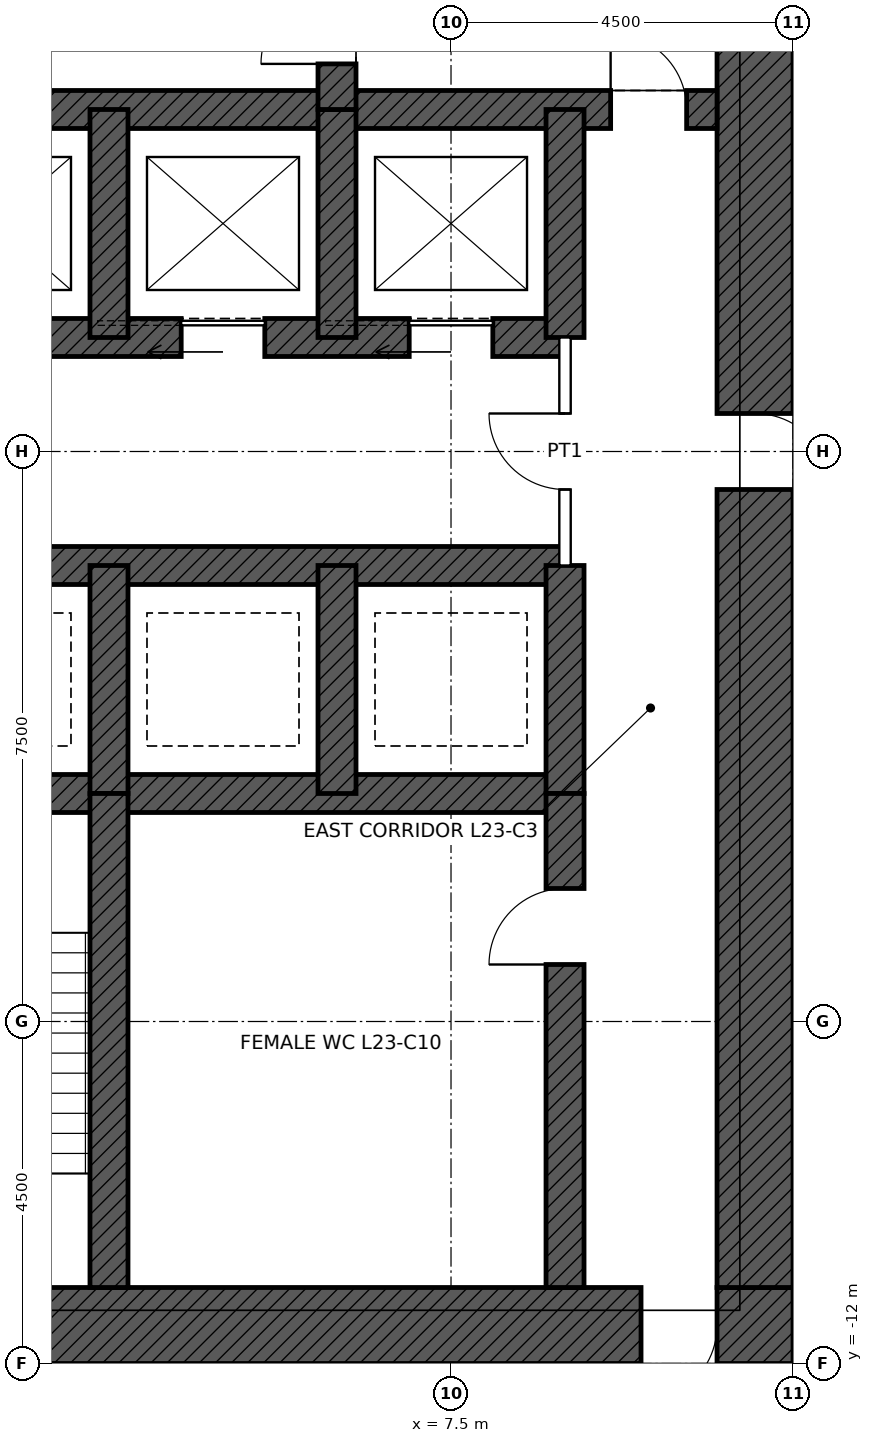
"""IFC4 building model, lengths in metres.
Left out: names, types, materials, properties, quantities, classifications, styles, units other than length and angle.
Written with IfcOpenShell. Run it as: python <this file> out.ifc"""

import sys

from ifc_helpers import new_model, si_unit, direction, frame, frame_2d, origin, place, context, subcontext, project, spatial, rectangle, extrude, element, fill, save


model = new_model("IFC4")
c1 = context("Model", 3, precision=1e-05, world=origin(), true_north=direction((0.0, 1.0)))
c2 = subcontext(c1, "Body", "Model", "MODEL_VIEW")
j1 = project(units=[si_unit("LENGTHUNIT", "METRE"), si_unit("PLANEANGLEUNIT", "RADIAN")], contexts=[c1])
p1 = place(None, origin())
s1 = spatial("IfcSite", under=j1, at=p1, CompositionType="ELEMENT")
p2 = place(p1, origin())
s2 = spatial("IfcBuilding", under=s1, at=p2, CompositionType="ELEMENT")
p3 = place(p2, frame((0.0, 0.0, 117.9)))
s3 = spatial("IfcBuildingStorey", under=s2, at=p3, CompositionType="ELEMENT", Elevation=117.9)
p4 = place(p3, frame((12.0, -11.5, 0.0), z_axis=(0.0, 0.0, 1.0), x_axis=(-1.0, 0.0, 0.0)))
e1 = element("IfcWall", 1, at=p4, inside=s3, PredefinedType="SHEAR", context=c2, shape_type="SweptSolid", body=[
    extrude(rectangle(XDim=24.0, YDim=1.0, at=frame_2d((12.0, 0.0))), origin(), (0.0, 0.0, 1.0), 4.5),
])
p5 = place(p4, frame((11.5, 0.0, 0.0)))
e2 = element("IfcOpeningElement", 2, at=p5, cuts=e1, PredefinedType="OPENING", context=c2, shape_type="SweptSolid", body=[
    extrude(rectangle(XDim=1.0, YDim=2.1, at=frame_2d((0.5, 1.05))), frame((0.0, 0.51, 0.0), z_axis=(0.0, -1.0, 0.0), x_axis=(1.0, 0.0, 0.0)), (0.0, 0.0, 1.0), 1.02),
])
p6 = place(p4, frame((1.0, 0.0, 0.0)))
e3 = element("IfcOpeningElement", 3, at=p6, cuts=e1, PredefinedType="OPENING", context=c2, shape_type="SweptSolid", body=[
    extrude(rectangle(XDim=1.0, YDim=2.4, at=frame_2d((0.5, 1.2))), frame((0.0, 0.51, 0.0), z_axis=(0.0, -1.0, 0.0), x_axis=(1.0, 0.0, 0.0)), (0.0, 0.0, 1.0), 1.02),
])
p7 = place(p3, frame((11.5, 11.0, 0.0), z_axis=(0.0, 0.0, 1.0), x_axis=(0.0, -1.0, 0.0)))
e4 = element("IfcWall", 4, at=p7, inside=s3, PredefinedType="SHEAR", context=c2, shape_type="SweptSolid", body=[
    extrude(rectangle(XDim=22.0, YDim=1.0, at=frame_2d((11.0, 0.0))), origin(), (0.0, 0.0, 1.0), 4.5),
])
p8 = place(p7, frame((10.5, 0.0, 0.0)))
e5 = element("IfcOpeningElement", 5, at=p8, cuts=e4, PredefinedType="OPENING", context=c2, shape_type="SweptSolid", body=[
    extrude(rectangle(XDim=1.0, YDim=2.4, at=frame_2d((0.5, 1.2))), frame((0.0, 0.51, 0.0), z_axis=(0.0, -1.0, 0.0), x_axis=(1.0, 0.0, 0.0)), (0.0, 0.0, 1.0), 1.02),
])
p9 = place(p3, frame((-11.0, 4.5, 0.0), z_axis=(0.0, 0.0, 1.0), x_axis=(1.0, 0.0, 0.0)))
e6 = element("IfcWall", 6, at=p9, inside=s3, PredefinedType="SHEAR", context=c2, shape_type="SweptSolid", body=[
    extrude(rectangle(XDim=22.0, YDim=0.5, at=frame_2d((11.0, 0.0))), origin(), (0.0, 0.0, 1.0), 4.5),
])
p10 = place(p9, frame((0.4, 0.0, 0.0)))
e7 = element("IfcOpeningElement", 7, at=p10, cuts=e6, PredefinedType="OPENING", context=c2, shape_type="SweptSolid", body=[
    extrude(rectangle(XDim=1.0, YDim=2.1, at=frame_2d((0.5, 1.05))), frame((0.0, 0.26, 0.0), z_axis=(0.0, -1.0, 0.0), x_axis=(1.0, 0.0, 0.0)), (0.0, 0.0, 1.0), 0.52),
])
p11 = place(p9, frame((20.6, 0.0, 0.0)))
e8 = element("IfcOpeningElement", 8, at=p11, cuts=e6, PredefinedType="OPENING", context=c2, shape_type="SweptSolid", body=[
    extrude(rectangle(XDim=1.0, YDim=2.1, at=frame_2d((0.5, 1.05))), frame((0.0, 0.26, 0.0), z_axis=(0.0, -1.0, 0.0), x_axis=(1.0, 0.0, 0.0)), (0.0, 0.0, 1.0), 0.52),
])
p12 = place(p3, frame((-9.0, 1.5, 0.0), z_axis=(0.0, 0.0, 1.0), x_axis=(1.0, 0.0, 0.0)))
e9 = element("IfcWall", 9, at=p12, inside=s3, PredefinedType="SHEAR", context=c2, shape_type="SweptSolid", body=[
    extrude(rectangle(XDim=18.0, YDim=0.5, at=frame_2d((9.0, 0.0))), origin(), (0.0, 0.0, 1.0), 4.5),
])
p13 = place(p12, frame((9.95, 0.0, 0.0)))
e10 = element("IfcOpeningElement", 10, at=p13, cuts=e9, PredefinedType="OPENING", context=c2, shape_type="SweptSolid", body=[
    extrude(rectangle(XDim=1.1, YDim=2.1, at=frame_2d((0.55, 1.05))), frame((0.0, 0.26, 0.0), z_axis=(0.0, -1.0, 0.0), x_axis=(1.0, 0.0, 0.0)), (0.0, 0.0, 1.0), 0.52),
])
p14 = place(p12, frame((12.95, 0.0, 0.0)))
e11 = element("IfcOpeningElement", 11, at=p14, cuts=e9, PredefinedType="OPENING", context=c2, shape_type="SweptSolid", body=[
    extrude(rectangle(XDim=1.1, YDim=2.1, at=frame_2d((0.55, 1.05))), frame((0.0, 0.26, 0.0), z_axis=(0.0, -1.0, 0.0), x_axis=(1.0, 0.0, 0.0)), (0.0, 0.0, 1.0), 0.52),
])
p15 = place(p12, frame((15.95, 0.0, 0.0)))
e12 = element("IfcOpeningElement", 12, at=p15, cuts=e9, PredefinedType="OPENING", context=c2, shape_type="SweptSolid", body=[
    extrude(rectangle(XDim=1.1, YDim=2.1, at=frame_2d((0.55, 1.05))), frame((0.0, 0.26, 0.0), z_axis=(0.0, -1.0, 0.0), x_axis=(1.0, 0.0, 0.0)), (0.0, 0.0, 1.0), 0.52),
])
p16 = place(p12, frame((0.95, 0.0, 0.0)))
e13 = element("IfcOpeningElement", 13, at=p16, cuts=e9, PredefinedType="OPENING", context=c2, shape_type="SweptSolid", body=[
    extrude(rectangle(XDim=1.1, YDim=2.1, at=frame_2d((0.55, 1.05))), frame((0.0, 0.26, 0.0), z_axis=(0.0, -1.0, 0.0), x_axis=(1.0, 0.0, 0.0)), (0.0, 0.0, 1.0), 0.52),
])
p17 = place(p12, frame((3.95, 0.0, 0.0)))
e14 = element("IfcOpeningElement", 14, at=p17, cuts=e9, PredefinedType="OPENING", context=c2, shape_type="SweptSolid", body=[
    extrude(rectangle(XDim=1.1, YDim=2.1, at=frame_2d((0.55, 1.05))), frame((0.0, 0.26, 0.0), z_axis=(0.0, -1.0, 0.0), x_axis=(1.0, 0.0, 0.0)), (0.0, 0.0, 1.0), 0.52),
])
p18 = place(p12, frame((6.95, 0.0, 0.0)))
e15 = element("IfcOpeningElement", 15, at=p18, cuts=e9, PredefinedType="OPENING", context=c2, shape_type="SweptSolid", body=[
    extrude(rectangle(XDim=1.1, YDim=2.1, at=frame_2d((0.55, 1.05))), frame((0.0, 0.26, 0.0), z_axis=(0.0, -1.0, 0.0), x_axis=(1.0, 0.0, 0.0)), (0.0, 0.0, 1.0), 0.52),
])
for number, where, z_axis, x_axis in (
    (16, (-9.0, -1.5, 0.0), (0.0, 0.0, 1.0), (1.0, 0.0, 0.0)),
    (17, (-9.0, -4.5, 0.0), (0.0, 0.0, 1.0), (1.0, 0.0, 0.0)),
):
    element("IfcWall", number, at=place(p3, frame(where, z_axis=z_axis, x_axis=x_axis)), inside=s3, PredefinedType="SHEAR", context=c2, shape_type="SweptSolid", body=[
        extrude(rectangle(XDim=18.0, YDim=0.5, at=frame_2d((9.0, 0.0))), origin(), (0.0, 0.0, 1.0), 4.5),
    ])
for number, where, z_axis, x_axis in (
    (18, (9.0, 1.5, 0.0), (0.0, 0.0, 1.0), (0.0, 1.0, 0.0)),
    (19, (9.0, -4.5, 0.0), (0.0, 0.0, 1.0), (0.0, 1.0, 0.0)),
    (20, (3.0, 1.5, 0.0), (0.0, 0.0, 1.0), (0.0, 1.0, 0.0)),
    (21, (6.0, 1.5, 0.0), (0.0, 0.0, 1.0), (0.0, 1.0, 0.0)),
    (22, (3.0, -4.5, 0.0), (0.0, 0.0, 1.0), (0.0, 1.0, 0.0)),
    (23, (6.0, -4.5, 0.0), (0.0, 0.0, 1.0), (0.0, 1.0, 0.0)),
):
    element("IfcWall", number, at=place(p3, frame(where, z_axis=z_axis, x_axis=x_axis)), inside=s3, PredefinedType="SHEAR", context=c2, shape_type="SweptSolid", body=[
        extrude(rectangle(XDim=3.0, YDim=0.5, at=frame_2d((1.5, 0.0))), origin(), (0.0, 0.0, 1.0), 4.5),
    ])
p19 = place(p3, frame((6.0, 4.5, 0.0), z_axis=(0.0, 0.0, 1.0), x_axis=(0.0, 1.0, 0.0)))
e24 = element("IfcWall", 24, at=p19, inside=s3, PredefinedType="SHEAR", context=c2, shape_type="SweptSolid", body=[
    extrude(rectangle(XDim=6.5, YDim=0.5, at=frame_2d((3.25, 0.0))), origin(), (0.0, 0.0, 1.0), 4.5),
])
p20 = place(p19, frame((0.6, 0.0, 0.0)))
e25 = element("IfcOpeningElement", 25, at=p20, cuts=e24, PredefinedType="OPENING", context=c2, shape_type="SweptSolid", body=[
    extrude(rectangle(XDim=1.0, YDim=2.1, at=frame_2d((0.5, 1.05))), frame((0.0, 0.26, 0.0), z_axis=(0.0, -1.0, 0.0), x_axis=(1.0, 0.0, 0.0)), (0.0, 0.0, 1.0), 0.52),
])
p21 = place(p3, frame((9.0, -11.0, 0.0), z_axis=(0.0, 0.0, 1.0), x_axis=(0.0, 1.0, 0.0)))
e26 = element("IfcWall", 26, at=p21, inside=s3, PredefinedType="SHEAR", context=c2, shape_type="SweptSolid", body=[
    extrude(rectangle(XDim=6.5, YDim=0.5, at=frame_2d((3.25, 0.0))), origin(), (0.0, 0.0, 1.0), 4.5),
])
p22 = place(p21, frame((4.25, 0.0, 0.0)))
e27 = element("IfcOpeningElement", 27, at=p22, cuts=e26, PredefinedType="OPENING", context=c2, shape_type="SweptSolid", body=[
    extrude(rectangle(XDim=1.0, YDim=2.1, at=frame_2d((0.5, 1.05))), frame((0.0, 0.26, 0.0), z_axis=(0.0, -1.0, 0.0), x_axis=(1.0, 0.0, 0.0)), (0.0, 0.0, 1.0), 0.52),
])
p23 = place(p3, frame((3.0, -11.0, 0.0), z_axis=(0.0, 0.0, 1.0), x_axis=(0.0, 1.0, 0.0)))
e28 = element("IfcWall", 28, at=p23, inside=s3, PredefinedType="SHEAR", context=c2, shape_type="SweptSolid", body=[
    extrude(rectangle(XDim=6.5, YDim=0.5, at=frame_2d((3.25, 0.0))), origin(), (0.0, 0.0, 1.0), 4.5),
])
p24 = place(p3, frame((9.0, -1.5, 0.0), z_axis=(0.0, 0.0, 1.0), x_axis=(0.0, 1.0, 0.0)))
e29 = element("IfcWall", 29, at=p24, inside=s3, PredefinedType="PARTITIONING", context=c2, shape_type="SweptSolid", body=[
    extrude(rectangle(XDim=3.0, YDim=0.15, at=frame_2d((1.5, 0.0))), origin(), (0.0, 0.0, 1.0), 4.25),
])
p25 = place(p24, frame((1.0, 0.0, 0.0)))
e30 = element("IfcOpeningElement", 30, at=p25, cuts=e29, PredefinedType="OPENING", context=c2, shape_type="SweptSolid", body=[
    extrude(rectangle(XDim=1.0, YDim=2.4, at=frame_2d((0.5, 1.2))), frame((0.0, 0.085, 0.0), z_axis=(0.0, -1.0, 0.0), x_axis=(1.0, 0.0, 0.0)), (0.0, 0.0, 1.0), 0.17),
])
p26 = place(p11, origin())
e31 = element("IfcDoor", 31, at=p26, inside=s3, OperationType="SINGLE_SWING_LEFT", PredefinedType="DOOR", context=c2, shape_type="SweptSolid", body=[
    extrude(rectangle(XDim=1.0, YDim=2.1, at=frame_2d((0.5, 1.05))), frame((0.0, 0.025, 0.0), z_axis=(0.0, -1.0, 0.0), x_axis=(1.0, 0.0, 0.0)), (0.0, 0.0, 1.0), 0.05),
])
fill(e8, e31)
p27 = place(p20, origin())
e32 = element("IfcDoor", 32, at=p27, inside=s3, OperationType="SINGLE_SWING_LEFT", PredefinedType="DOOR", context=c2, shape_type="SweptSolid", body=[
    extrude(rectangle(XDim=1.0, YDim=2.1, at=frame_2d((0.5, 1.05))), frame((0.0, 0.025, 0.0), z_axis=(0.0, -1.0, 0.0), x_axis=(1.0, 0.0, 0.0)), (0.0, 0.0, 1.0), 0.05),
])
fill(e25, e32)
p28 = place(p8, origin())
e33 = element("IfcDoor", 33, at=p28, inside=s3, OperationType="SINGLE_SWING_RIGHT", PredefinedType="DOOR", context=c2, shape_type="SweptSolid", body=[
    extrude(rectangle(XDim=1.0, YDim=2.4, at=frame_2d((0.5, 1.2))), frame((0.0, 0.485, 0.0), z_axis=(0.0, -1.0, 0.0), x_axis=(1.0, 0.0, 0.0)), (0.0, 0.0, 1.0), 0.05),
])
fill(e5, e33)
p29 = place(p6, origin())
e34 = element("IfcDoor", 34, at=p29, inside=s3, OperationType="SINGLE_SWING_RIGHT", PredefinedType="DOOR", context=c2, shape_type="SweptSolid", body=[
    extrude(rectangle(XDim=1.0, YDim=2.4, at=frame_2d((0.5, 1.2))), frame((0.0, 0.485, 0.0), z_axis=(0.0, -1.0, 0.0), x_axis=(1.0, 0.0, 0.0)), (0.0, 0.0, 1.0), 0.05),
])
fill(e3, e34)
p30 = place(p22, origin())
e35 = element("IfcDoor", 35, at=p30, inside=s3, OperationType="SINGLE_SWING_LEFT", PredefinedType="DOOR", context=c2, shape_type="SweptSolid", body=[
    extrude(rectangle(XDim=1.0, YDim=2.1, at=frame_2d((0.5, 1.05))), frame((0.0, 0.025, 0.0), z_axis=(0.0, -1.0, 0.0), x_axis=(1.0, 0.0, 0.0)), (0.0, 0.0, 1.0), 0.05),
])
fill(e27, e35)
p31 = place(p14, origin())
e36 = element("IfcDoor", 36, at=p31, inside=s3, OperationType="SLIDING_TO_LEFT", PredefinedType="DOOR", context=c2, shape_type="SweptSolid", body=[
    extrude(rectangle(XDim=1.1, YDim=2.1, at=frame_2d((0.55, 1.05))), frame((0.0, 0.025, 0.0), z_axis=(0.0, -1.0, 0.0), x_axis=(1.0, 0.0, 0.0)), (0.0, 0.0, 1.0), 0.05),
])
fill(e11, e36)
p32 = place(p15, origin())
e37 = element("IfcDoor", 37, at=p32, inside=s3, OperationType="SLIDING_TO_LEFT", PredefinedType="DOOR", context=c2, shape_type="SweptSolid", body=[
    extrude(rectangle(XDim=1.1, YDim=2.1, at=frame_2d((0.55, 1.05))), frame((0.0, 0.025, 0.0), z_axis=(0.0, -1.0, 0.0), x_axis=(1.0, 0.0, 0.0)), (0.0, 0.0, 1.0), 0.05),
])
fill(e12, e37)
p33 = place(p25, origin())
e38 = element("IfcDoor", 38, at=p33, inside=s3, OperationType="SINGLE_SWING_RIGHT", PredefinedType="DOOR", context=c2, shape_type="SweptSolid", body=[
    extrude(rectangle(XDim=1.0, YDim=2.4, at=frame_2d((0.5, 1.2))), frame((0.0, 0.025, 0.0), z_axis=(0.0, -1.0, 0.0), x_axis=(1.0, 0.0, 0.0)), (0.0, 0.0, 1.0), 0.05),
])
fill(e30, e38)
save(model, sys.argv[1])
